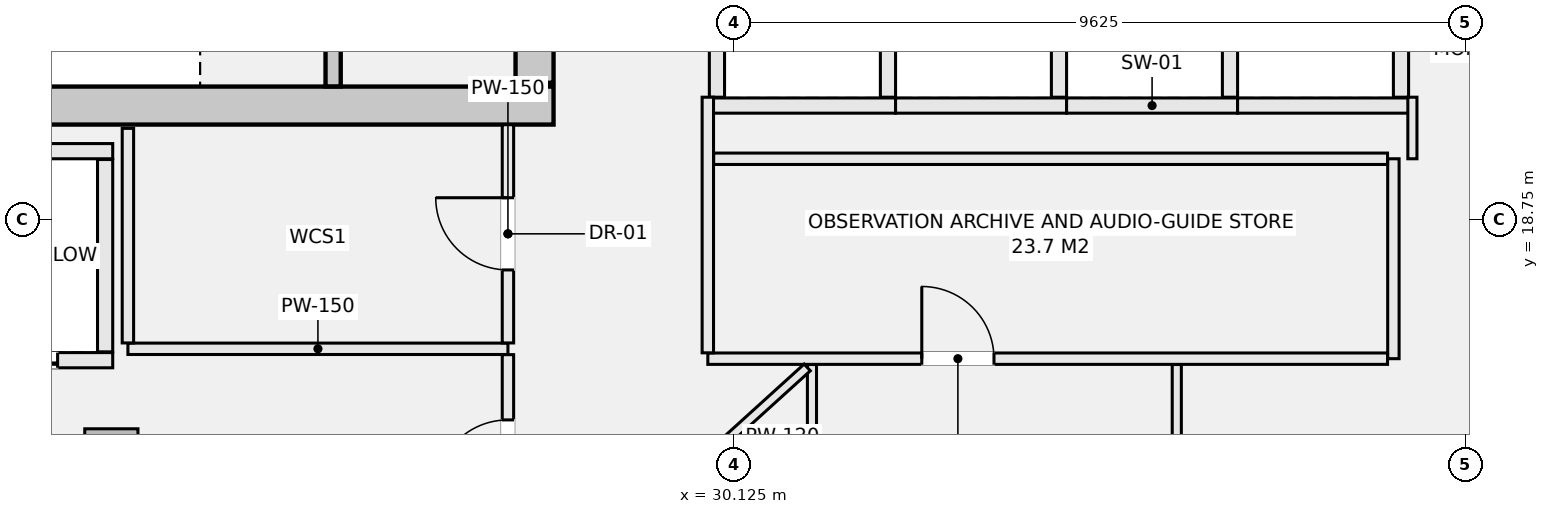
"""IFC4 building model, lengths in metres.
Left out: names, types, materials, properties, quantities, classifications, styles, units other than length and angle.
Written with IfcOpenShell. Run it as: python <this file> out.ifc"""

import sys

from ifc_helpers import new_model, si_unit, direction, frame, frame_2d, origin, origin_2d, place, context, subcontext, project, spatial, rectangle, extrude, element, fill, save


model = new_model("IFC4")
c1 = context("Model", 3, precision=1e-05, world=origin(), true_north=direction((0.0, 1.0)))
c2 = subcontext(c1, "Body", "Model", "MODEL_VIEW")
j1 = project(units=[si_unit("LENGTHUNIT", "METRE"), si_unit("PLANEANGLEUNIT", "RADIAN")], contexts=[c1])
p1 = place(None, origin())
s1 = spatial("IfcSite", under=j1, at=p1, CompositionType="ELEMENT")
p2 = place(p1, origin())
s2 = spatial("IfcBuilding", under=s1, at=p2, CompositionType="ELEMENT")
p3 = place(p2, frame((0.0, 0.0, 281.6)))
s3 = spatial("IfcBuildingStorey", under=s2, at=p3, CompositionType="ELEMENT", Elevation=281.6)
p4 = place(p3, frame((14.25, 20.25, -0.28), z_axis=(0.0, 0.0, 1.0), x_axis=(1.0, 0.0, 0.0)))
e1 = element("IfcWall", 1, at=p4, inside=s3, PredefinedType="SHEAR", context=c2, shape_type="SweptSolid", body=[
    extrude(rectangle(XDim=13.5, YDim=0.5, at=frame_2d((6.75, 0.0))), origin(), (0.0, 0.0, 1.0), 5.78),
])
p5 = place(p3, frame((27.5, 20.55, -0.28), z_axis=(0.0, 0.0, 1.0), x_axis=(0.0, 1.0, 0.0)))
e2 = element("IfcWall", 2, at=p5, inside=s3, PredefinedType="SHEAR", context=c2, shape_type="SweptSolid", body=[
    extrude(rectangle(XDim=1.5, YDim=0.5, at=frame_2d((0.75, 0.0))), origin(), (0.0, 0.0, 1.0), 5.78),
])
p6 = place(p3, frame((21.932, 15.648, -0.28), z_axis=(0.0, 0.0, 1.0), x_axis=(1.0, 0.0, 0.0)))
e3 = element("IfcColumn", 3, at=p6, inside=s3, PredefinedType="COLUMN", context=c2, shape_type="SweptSolid", body=[
    extrude(rectangle(XDim=0.7, YDim=0.7, at=origin_2d()), origin(), (0.0, 0.0, 1.0), 5.78),
])
p7 = place(p3, frame((39.688, 13.75, 5.75), z_axis=(0.0, 0.0, 1.0), x_axis=(0.616428247224, 0.78741108452, 0.0)))
e4 = element("IfcWall", 4, at=p7, inside=s3, PredefinedType="PARAPET", context=c2, shape_type="SweptSolid", body=[
    extrude(rectangle(XDim=4.553, YDim=0.25, at=frame_2d((2.277, 0.0))), origin(), (0.0, 0.0, 1.0), 1.15),
])
p8 = place(p3, frame((24.85, 20.502, -0.28), z_axis=(0.0, 0.0, 1.0), x_axis=(0.0, 1.0, 0.0)))
e5 = element("IfcWall", 5, at=p8, inside=s3, PredefinedType="SHEAR", context=c2, shape_type="SweptSolid", body=[
    extrude(rectangle(XDim=3.038, YDim=0.2, at=frame_2d((1.519, 0.0))), origin(), (0.0, 0.0, 1.0), 5.78),
])
p9 = place(p8, frame((0.969, 0.0, 0.28)))
e6 = element("IfcOpeningElement", 6, at=p9, cuts=e5, PredefinedType="OPENING", context=c2, shape_type="SweptSolid", body=[
    extrude(rectangle(XDim=1.1, YDim=2.15, at=frame_2d((0.55, 1.075))), frame((0.0, 0.11, 0.0), z_axis=(0.0, -1.0, 0.0), x_axis=(1.0, 0.0, 0.0)), (0.0, 0.0, 1.0), 0.22),
])
p10 = place(p3, frame((19.4, 19.65, 0.0), z_axis=(0.0, 0.0, 1.0), x_axis=(1.0, 0.0, 0.0)))
e7 = element("IfcWall", 7, at=p10, inside=s3, PredefinedType="SOLIDWALL", context=c2, shape_type="SweptSolid", body=[
    extrude(rectangle(XDim=2.55, YDim=0.2, at=frame_2d((1.275, 0.0))), origin(), (0.0, 0.0, 1.0), 5.5),
])
p11 = place(p3, frame((19.4, 16.9, 0.0), z_axis=(0.0, 0.0, 1.0), x_axis=(1.0, 0.0, 0.0)))
e8 = element("IfcWall", 8, at=p11, inside=s3, PredefinedType="SOLIDWALL", context=c2, shape_type="SweptSolid", body=[
    extrude(rectangle(XDim=2.55, YDim=0.2, at=frame_2d((1.275, 0.0))), origin(), (0.0, 0.0, 1.0), 5.5),
])
p12 = place(p11, frame((0.725, 0.0, 0.0)))
e9 = element("IfcOpeningElement", 9, at=p12, cuts=e8, PredefinedType="OPENING", context=c2, shape_type="SweptSolid", body=[
    extrude(rectangle(XDim=1.1, YDim=2.2, at=frame_2d((0.55, 1.1))), frame((0.0, 0.11, 0.0), z_axis=(0.0, -1.0, 0.0), x_axis=(1.0, 0.0, 0.0)), (0.0, 0.0, 1.0), 0.22),
])
p13 = place(p3, frame((21.85, 17.01, 0.0), z_axis=(0.0, 0.0, 1.0), x_axis=(0.0, 1.0, 0.0)))
e10 = element("IfcWall", 10, at=p13, inside=s3, PredefinedType="SOLIDWALL", context=c2, shape_type="SweptSolid", body=[
    extrude(rectangle(XDim=2.53, YDim=0.2, at=frame_2d((1.265, 0.0))), origin(), (0.0, 0.0, 1.0), 5.5),
])
p14 = place(p3, frame((29.8, 20.25, 0.0), z_axis=(0.0, 0.0, 1.0), x_axis=(1.0, 0.0, 0.0)))
e11 = element("IfcWall", 11, at=p14, inside=s3, PredefinedType="SOLIDWALL", context=c2, shape_type="SweptSolid", body=[
    extrude(rectangle(XDim=2.45, YDim=0.2, at=frame_2d((1.225, 0.0))), origin(), (0.0, 0.0, 1.0), 5.5),
])
for number, where, z_axis, x_axis in (
    (12, (29.9, 20.36, 0.0), (0.0, 0.0, 1.0), (0.0, 1.0, 0.0)),
    (13, (32.15, 20.36, 0.0), (0.0, 0.0, 1.0), (0.0, 1.0, 0.0)),
):
    element("IfcWall", number, at=place(p3, frame(where, z_axis=z_axis, x_axis=x_axis)), inside=s3, PredefinedType="SOLIDWALL", context=c2, shape_type="SweptSolid", body=[
        extrude(rectangle(XDim=2.43, YDim=0.2, at=frame_2d((1.215, 0.0))), origin(), (0.0, 0.0, 1.0), 5.5),
    ])
p15 = place(p3, frame((32.25, 20.25, 0.0), z_axis=(0.0, 0.0, 1.0), x_axis=(1.0, 0.0, 0.0)))
e14 = element("IfcWall", 14, at=p15, inside=s3, PredefinedType="SOLIDWALL", context=c2, shape_type="SweptSolid", body=[
    extrude(rectangle(XDim=2.25, YDim=0.2, at=frame_2d((1.125, 0.0))), origin(), (0.0, 0.0, 1.0), 5.5),
])
p16 = place(p3, frame((34.4, 20.36, 0.0), z_axis=(0.0, 0.0, 1.0), x_axis=(0.0, 1.0, 0.0)))
e15 = element("IfcWall", 15, at=p16, inside=s3, PredefinedType="SOLIDWALL", context=c2, shape_type="SweptSolid", body=[
    extrude(rectangle(XDim=2.43, YDim=0.2, at=frame_2d((1.215, 0.0))), origin(), (0.0, 0.0, 1.0), 5.5),
])
p17 = place(p3, frame((34.5, 20.25, 0.0), z_axis=(0.0, 0.0, 1.0), x_axis=(1.0, 0.0, 0.0)))
e16 = element("IfcWall", 16, at=p17, inside=s3, PredefinedType="SOLIDWALL", context=c2, shape_type="SweptSolid", body=[
    extrude(rectangle(XDim=2.25, YDim=0.2, at=frame_2d((1.125, 0.0))), origin(), (0.0, 0.0, 1.0), 5.5),
])
p18 = place(p3, frame((36.65, 20.36, 0.0), z_axis=(0.0, 0.0, 1.0), x_axis=(0.0, 1.0, 0.0)))
e17 = element("IfcWall", 17, at=p18, inside=s3, PredefinedType="SOLIDWALL", context=c2, shape_type="SweptSolid", body=[
    extrude(rectangle(XDim=2.43, YDim=0.2, at=frame_2d((1.215, 0.0))), origin(), (0.0, 0.0, 1.0), 5.5),
])
p19 = place(p3, frame((36.75, 20.25, 0.0), z_axis=(0.0, 0.0, 1.0), x_axis=(1.0, 0.0, 0.0)))
e18 = element("IfcWall", 18, at=p19, inside=s3, PredefinedType="SOLIDWALL", context=c2, shape_type="SweptSolid", body=[
    extrude(rectangle(XDim=2.25, YDim=0.2, at=frame_2d((1.125, 0.0))), origin(), (0.0, 0.0, 1.0), 5.5),
])
p20 = place(p3, frame((38.9, 20.36, 0.0), z_axis=(0.0, 0.0, 1.0), x_axis=(0.0, 1.0, 0.0)))
e19 = element("IfcWall", 19, at=p20, inside=s3, PredefinedType="SOLIDWALL", context=c2, shape_type="SweptSolid", body=[
    extrude(rectangle(XDim=2.43, YDim=0.2, at=frame_2d((1.215, 0.0))), origin(), (0.0, 0.0, 1.0), 5.5),
])
p21 = place(p3, frame((22.15, 17.05, 0.0), z_axis=(0.0, 0.0, 1.0), x_axis=(1.0, 0.0, 0.0)))
e20 = element("IfcWall", 20, at=p21, inside=s3, PredefinedType="PARTITIONING", context=c2, shape_type="SweptSolid", body=[
    extrude(rectangle(XDim=5.0, YDim=0.15, at=frame_2d((2.5, 0.0))), origin(), (0.0, 0.0, 1.0), 5.5),
])
p22 = place(p3, frame((22.15, 17.127, 0.0), z_axis=(0.0, 0.0, 1.0), x_axis=(0.0, 1.0, 0.0)))
e21 = element("IfcWall", 21, at=p22, inside=s3, PredefinedType="PARTITIONING", context=c2, shape_type="SweptSolid", body=[
    extrude(rectangle(XDim=2.823, YDim=0.15, at=frame_2d((1.412, 0.0))), origin(), (0.0, 0.0, 1.0), 5.5),
])
p23 = place(p3, frame((27.15, 14.306, 0.0), z_axis=(0.0, 0.0, 1.0), x_axis=(0.0, 1.0, 0.0)))
e22 = element("IfcWall", 22, at=p23, inside=s3, PredefinedType="PARTITIONING", context=c2, shape_type="SweptSolid", body=[
    extrude(rectangle(XDim=2.667, YDim=0.15, at=frame_2d((1.333, 0.0))), origin(), (0.0, 0.0, 1.0), 5.5),
])
p24 = place(p23, frame((0.858, 0.0, 0.0)))
e23 = element("IfcOpeningElement", 23, at=p24, cuts=e22, PredefinedType="OPENING", context=c2, shape_type="SweptSolid", body=[
    extrude(rectangle(XDim=0.95, YDim=2.1, at=frame_2d((0.475, 1.05))), frame((0.0, 0.085, 0.0), z_axis=(0.0, -1.0, 0.0), x_axis=(1.0, 0.0, 0.0)), (0.0, 0.0, 1.0), 0.17),
])
p25 = place(p3, frame((27.15, 17.127, 0.0), z_axis=(0.0, 0.0, 1.0), x_axis=(0.0, 1.0, 0.0)))
e24 = element("IfcWall", 24, at=p25, inside=s3, PredefinedType="PARTITIONING", context=c2, shape_type="SweptSolid", body=[
    extrude(rectangle(XDim=2.871, YDim=0.15, at=frame_2d((1.436, 0.0))), origin(), (0.0, 0.0, 1.0), 5.5),
])
p26 = place(p25, frame((0.96, 0.0, 0.0)))
e25 = element("IfcOpeningElement", 25, at=p26, cuts=e24, PredefinedType="OPENING", context=c2, shape_type="SweptSolid", body=[
    extrude(rectangle(XDim=0.95, YDim=2.1, at=frame_2d((0.475, 1.05))), frame((0.0, 0.085, 0.0), z_axis=(0.0, -1.0, 0.0), x_axis=(1.0, 0.0, 0.0)), (0.0, 0.0, 1.0), 0.17),
])
p27 = place(p3, frame((38.8, 16.92, 0.0), z_axis=(0.0, 0.0, 1.0), x_axis=(0.0, 1.0, 0.0)))
e26 = element("IfcWall", 26, at=p27, inside=s3, PredefinedType="PARTITIONING", context=c2, shape_type="SweptSolid", body=[
    extrude(rectangle(XDim=2.63, YDim=0.15, at=frame_2d((1.315, 0.0))), origin(), (0.0, 0.0, 1.0), 5.5),
])
p28 = place(p3, frame((29.78, 16.92, 0.0), z_axis=(0.0, 0.0, 1.0), x_axis=(1.0, 0.0, 0.0)))
e27 = element("IfcWall", 27, at=p28, inside=s3, PredefinedType="PARTITIONING", context=c2, shape_type="SweptSolid", body=[
    extrude(rectangle(XDim=8.943, YDim=0.15, at=frame_2d((4.471, 0.0))), origin(), (0.0, 0.0, 1.0), 5.5),
])
p29 = place(p28, frame((2.815, 0.0, 0.0)))
e28 = element("IfcOpeningElement", 28, at=p29, cuts=e27, PredefinedType="OPENING", context=c2, shape_type="SweptSolid", body=[
    extrude(rectangle(XDim=0.95, YDim=2.1, at=frame_2d((0.475, 1.05))), frame((0.0, 0.085, 0.0), z_axis=(0.0, -1.0, 0.0), x_axis=(1.0, 0.0, 0.0)), (0.0, 0.0, 1.0), 0.17),
])
p30 = place(p3, frame((29.78, 16.997, 0.0), z_axis=(0.0, 0.0, 1.0), x_axis=(0.0, 1.0, 0.0)))
e29 = element("IfcWall", 29, at=p30, inside=s3, PredefinedType="PARTITIONING", context=c2, shape_type="SweptSolid", body=[
    extrude(rectangle(XDim=3.363, YDim=0.15, at=frame_2d((1.682, 0.0))), origin(), (0.0, 0.0, 1.0), 5.5),
])
p31 = place(p3, frame((29.857, 19.55, 0.0), z_axis=(0.0, 0.0, 1.0), x_axis=(1.0, 0.0, 0.0)))
e30 = element("IfcWall", 30, at=p31, inside=s3, PredefinedType="PARTITIONING", context=c2, shape_type="SweptSolid", body=[
    extrude(rectangle(XDim=8.866, YDim=0.15, at=frame_2d((4.433, 0.0))), origin(), (0.0, 0.0, 1.0), 5.5),
])
p32 = place(p3, frame((39.05, 19.55, 0.0), z_axis=(0.0, 0.0, 1.0), x_axis=(0.0, 1.0, 0.0)))
e31 = element("IfcWall", 31, at=p32, inside=s3, PredefinedType="PARTITIONING", context=c2, shape_type="SweptSolid", body=[
    extrude(rectangle(XDim=0.81, YDim=0.12, at=frame_2d((0.405, 0.0))), origin(), (0.0, 0.0, 1.0), 5.5),
])
p33 = place(p3, frame((35.95, 14.913, 0.0), z_axis=(0.0, 0.0, 1.0), x_axis=(0.0, 1.0, 0.0)))
e32 = element("IfcWall", 32, at=p33, inside=s3, PredefinedType="PARTITIONING", context=c2, shape_type="SweptSolid", body=[
    extrude(rectangle(XDim=1.93, YDim=0.12, at=frame_2d((0.965, 0.0))), origin(), (0.0, 0.0, 1.0), 5.5),
])
p34 = place(p3, frame((31.15, 14.163, 0.0), z_axis=(0.0, 0.0, 1.0), x_axis=(0.0, 1.0, 0.0)))
e33 = element("IfcWall", 33, at=p34, inside=s3, PredefinedType="PARTITIONING", context=c2, shape_type="SweptSolid", body=[
    extrude(rectangle(XDim=2.68, YDim=0.12, at=frame_2d((1.34, 0.0))), origin(), (0.0, 0.0, 1.0), 5.5),
])
p35 = place(p3, frame((29.531, 15.394, 0.0), z_axis=(0.0, 0.0, 1.0), x_axis=(0.741053805891, 0.671445646925, 0.0)))
e34 = element("IfcWall", 34, at=p35, inside=s3, PredefinedType="PARTITIONING", context=c2, shape_type="SweptSolid", body=[
    extrude(rectangle(XDim=2.101, YDim=0.12, at=frame_2d((1.05, 0.0))), origin(), (0.0, 0.0, 1.0), 5.5),
])
p36 = place(p12, origin())
e35 = element("IfcDoor", 35, at=p36, inside=s3, OperationType="SLIDING_TO_LEFT", PredefinedType="DOOR", context=c2, shape_type="SweptSolid", body=[
    extrude(rectangle(XDim=1.1, YDim=2.2, at=frame_2d((0.55, 1.1))), frame((0.0, 0.025, 0.0), z_axis=(0.0, -1.0, 0.0), x_axis=(1.0, 0.0, 0.0)), (0.0, 0.0, 1.0), 0.05),
])
fill(e9, e35)
p37 = place(p26, origin())
e36 = element("IfcDoor", 36, at=p37, inside=s3, OperationType="SINGLE_SWING_RIGHT", PredefinedType="DOOR", context=c2, shape_type="SweptSolid", body=[
    extrude(rectangle(XDim=0.95, YDim=2.1, at=frame_2d((0.475, 1.05))), frame((0.0, 0.025, 0.0), z_axis=(0.0, -1.0, 0.0), x_axis=(1.0, 0.0, 0.0)), (0.0, 0.0, 1.0), 0.05),
])
fill(e25, e36)
p38 = place(p29, origin())
e37 = element("IfcDoor", 37, at=p38, inside=s3, OperationType="SINGLE_SWING_LEFT", PredefinedType="DOOR", context=c2, shape_type="SweptSolid", body=[
    extrude(rectangle(XDim=0.95, YDim=2.1, at=frame_2d((0.475, 1.05))), frame((0.0, 0.025, 0.0), z_axis=(0.0, -1.0, 0.0), x_axis=(1.0, 0.0, 0.0)), (0.0, 0.0, 1.0), 0.05),
])
fill(e28, e37)
p39 = place(p24, origin())
e38 = element("IfcDoor", 38, at=p39, inside=s3, OperationType="SINGLE_SWING_LEFT", PredefinedType="DOOR", context=c2, shape_type="SweptSolid", body=[
    extrude(rectangle(XDim=0.95, YDim=2.1, at=frame_2d((0.475, 1.05))), frame((0.0, 0.025, 0.0), z_axis=(0.0, -1.0, 0.0), x_axis=(1.0, 0.0, 0.0)), (0.0, 0.0, 1.0), 0.05),
])
fill(e23, e38)
save(model, sys.argv[1])
